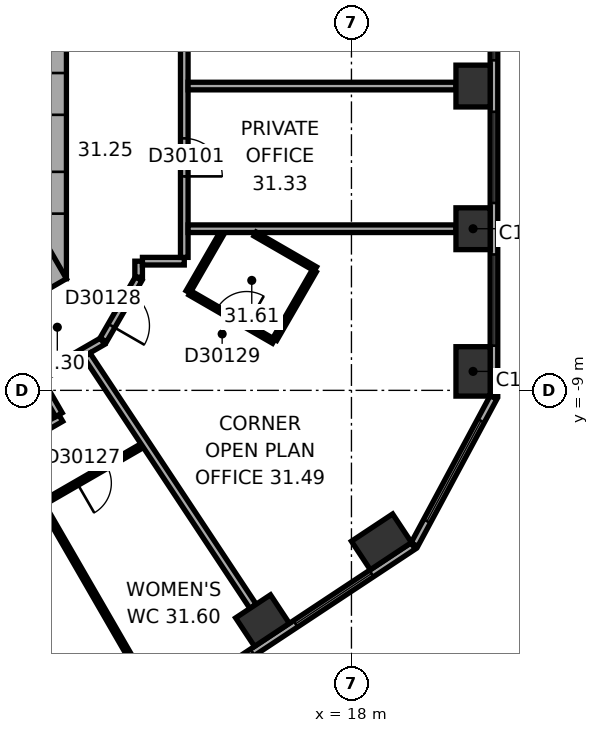
"""IFC4 building model, lengths in metres.
Left out: names, types, materials, properties, quantities, classifications, styles, units other than length and angle.
Written with IfcOpenShell. Run it as: python <this file> out.ifc"""

import sys

from ifc_helpers import new_model, si_unit, direction, frame, frame_2d, origin, origin_2d, place, context, subcontext, project, spatial, rectangle, extrude, element, fill, save


model = new_model("IFC4")
c1 = context("Model", 3, precision=1e-05, world=origin(), true_north=direction((0.0, 1.0)))
c2 = subcontext(c1, "Body", "Model", "MODEL_VIEW")
j1 = project(units=[si_unit("LENGTHUNIT", "METRE"), si_unit("PLANEANGLEUNIT", "RADIAN")], contexts=[c1])
p1 = place(None, origin())
s1 = spatial("IfcSite", under=j1, at=p1, CompositionType="ELEMENT")
p2 = place(p1, origin())
s2 = spatial("IfcBuilding", under=s1, at=p2, CompositionType="ELEMENT")
p3 = place(p2, frame((0.0, 0.0, 128.1)))
s3 = spatial("IfcBuildingStorey", under=s2, at=p3, CompositionType="ELEMENT", Elevation=128.1)
p4 = place(p3, frame((21.2, -8.501, 0.0), z_axis=(0.0, 0.0, 1.0), x_axis=(0.0, 1.0, 0.0)))
e1 = element("IfcColumn", 1, at=p4, inside=s3, PredefinedType="COLUMN", context=c2, shape_type="SweptSolid", body=[
    extrude(rectangle(XDim=1.3, YDim=0.9, at=origin_2d()), origin(), (0.0, 0.0, 1.0), 3.7),
])
for number, where, z_axis, x_axis in (
    (2, (21.2, -4.747, 0.0), (0.0, 0.0, 1.0), (0.0, 1.0, 0.0)),
    (3, (21.2, -0.993, 0.0), (0.0, 0.0, 1.0), (0.0, 1.0, 0.0)),
    (4, (15.659, -15.058, 0.0), (0.0, 0.0, 1.0), (0.834, 0.552, 0.0)),
):
    element("IfcColumn", number, at=place(p3, frame(where, z_axis=z_axis, x_axis=x_axis)), inside=s3, PredefinedType="COLUMN", context=c2, shape_type="SweptSolid", body=[
        extrude(rectangle(XDim=1.1, YDim=0.9, at=origin_2d()), origin(), (0.0, 0.0, 1.0), 3.7),
    ])
p5 = place(p3, frame((18.79, -12.986, 0.0), z_axis=(0.0, 0.0, 1.0), x_axis=(0.833885822067, 0.551936985312, 0.0)))
e5 = element("IfcColumn", 5, at=p5, inside=s3, PredefinedType="COLUMN", context=c2, shape_type="SweptSolid", body=[
    extrude(rectangle(XDim=1.3, YDim=0.9, at=origin_2d()), origin(), (0.0, 0.0, 1.0), 3.7),
])
p6 = place(p3, frame((10.0, -6.062, 0.0), z_axis=(0.0, 0.0, 1.0), x_axis=(0.0, 1.0, 0.0)))
e6 = element("IfcWall", 6, at=p6, inside=s3, PredefinedType="SHEAR", context=c2, shape_type="SweptSolid", body=[
    extrude(rectangle(XDim=12.125, YDim=1.0, at=frame_2d((6.062, 0.0))), origin(), (0.0, 0.0, 1.0), 3.7),
])
p7 = place(p6, frame((6.262, 0.0, 0.0)))
e7 = element("IfcOpeningElement", 7, at=p7, cuts=e6, PredefinedType="OPENING", context=c2, shape_type="SweptSolid", body=[
    extrude(rectangle(XDim=1.5, YDim=2.1, at=frame_2d((0.75, 1.05))), frame((0.0, 0.51, 0.0), z_axis=(0.0, -1.0, 0.0), x_axis=(1.0, 0.0, 0.0)), (0.0, 0.0, 1.0), 1.02),
])
p8 = place(p6, frame((1.712, 0.0, 0.0)))
e8 = element("IfcOpeningElement", 8, at=p8, cuts=e6, PredefinedType="OPENING", context=c2, shape_type="SweptSolid", body=[
    extrude(rectangle(XDim=1.1, YDim=2.1, at=frame_2d((0.55, 1.05))), frame((0.0, 0.51, 0.0), z_axis=(0.0, -1.0, 0.0), x_axis=(1.0, 0.0, 0.0)), (0.0, 0.0, 1.0), 1.02),
])
p9 = place(p6, frame((4.312, 0.0, 0.0)))
e9 = element("IfcOpeningElement", 9, at=p9, cuts=e6, PredefinedType="OPENING", context=c2, shape_type="SweptSolid", body=[
    extrude(rectangle(XDim=1.1, YDim=2.1, at=frame_2d((0.55, 1.05))), frame((0.0, 0.51, 0.0), z_axis=(0.0, -1.0, 0.0), x_axis=(1.0, 0.0, 0.0)), (0.0, 0.0, 1.0), 1.02),
])
p10 = place(p3, frame((-0.25, -11.691, 0.0), z_axis=(0.0, 0.0, 1.0), x_axis=(0.866022616891, 0.50000482701, 0.0)))
e10 = element("IfcWall", 10, at=p10, inside=s3, PredefinedType="SHEAR", context=c2, shape_type="SweptSolid", body=[
    extrude(rectangle(XDim=12.125, YDim=1.0, at=frame_2d((6.062, 0.0))), origin(), (0.0, 0.0, 1.0), 3.7),
])
p11 = place(p10, frame((4.012, 0.0, 0.0)))
e11 = element("IfcOpeningElement", 11, at=p11, cuts=e10, PredefinedType="OPENING", context=c2, shape_type="SweptSolid", body=[
    extrude(rectangle(XDim=0.9, YDim=2.1, at=frame_2d((0.45, 1.05))), frame((0.0, 0.51, 0.0), z_axis=(0.0, -1.0, 0.0), x_axis=(1.0, 0.0, 0.0)), (0.0, 0.0, 1.0), 1.02),
])
p12 = place(p10, frame((7.812, 0.0, 0.0)))
e12 = element("IfcOpeningElement", 12, at=p12, cuts=e10, PredefinedType="OPENING", context=c2, shape_type="SweptSolid", body=[
    extrude(rectangle(XDim=1.1, YDim=2.1, at=frame_2d((0.55, 1.05))), frame((0.0, 0.51, 0.0), z_axis=(0.0, -1.0, 0.0), x_axis=(1.0, 0.0, 0.0)), (0.0, 0.0, 1.0), 1.02),
])
p13 = place(p3, frame((21.75, -9.138, 0.0), z_axis=(0.0, 0.0, 1.0), x_axis=(0.0, 1.0, 0.0)))
e13 = element("IfcWall", 13, at=p13, inside=s3, PredefinedType="STANDARD", context=c2, shape_type="SweptSolid", body=[
    extrude(rectangle(XDim=20.044, YDim=0.2, at=frame_2d((10.022, 0.0))), origin(), (0.0, 0.0, 1.0), 3.7),
])
p14 = place(p13, frame((1.314, 0.0, 0.9)))
e14 = element("IfcOpeningElement", 14, at=p14, cuts=e13, PredefinedType="OPENING", context=c2, shape_type="SweptSolid", body=[
    extrude(rectangle(XDim=2.4, YDim=2.0, at=frame_2d((1.2, 1.0))), frame((0.0, 0.11, 0.0), z_axis=(0.0, -1.0, 0.0), x_axis=(1.0, 0.0, 0.0)), (0.0, 0.0, 1.0), 0.22),
])
p15 = place(p13, frame((5.069, 0.0, 0.9)))
e15 = element("IfcOpeningElement", 15, at=p15, cuts=e13, PredefinedType="OPENING", context=c2, shape_type="SweptSolid", body=[
    extrude(rectangle(XDim=2.4, YDim=2.0, at=frame_2d((1.2, 1.0))), frame((0.0, 0.11, 0.0), z_axis=(0.0, -1.0, 0.0), x_axis=(1.0, 0.0, 0.0)), (0.0, 0.0, 1.0), 0.22),
])
p16 = place(p13, frame((8.823, 0.0, 0.9)))
e16 = element("IfcOpeningElement", 16, at=p16, cuts=e13, PredefinedType="OPENING", context=c2, shape_type="SweptSolid", body=[
    extrude(rectangle(XDim=2.4, YDim=2.0, at=frame_2d((1.2, 1.0))), frame((0.0, 0.11, 0.0), z_axis=(0.0, -1.0, 0.0), x_axis=(1.0, 0.0, 0.0)), (0.0, 0.0, 1.0), 0.22),
])
p17 = place(p13, frame((12.577, 0.0, 0.9)))
e17 = element("IfcOpeningElement", 17, at=p17, cuts=e13, PredefinedType="OPENING", context=c2, shape_type="SweptSolid", body=[
    extrude(rectangle(XDim=2.4, YDim=2.0, at=frame_2d((1.2, 1.0))), frame((0.0, 0.11, 0.0), z_axis=(0.0, -1.0, 0.0), x_axis=(1.0, 0.0, 0.0)), (0.0, 0.0, 1.0), 0.22),
])
p18 = place(p13, frame((16.331, 0.0, 0.9)))
e18 = element("IfcOpeningElement", 18, at=p18, cuts=e13, PredefinedType="OPENING", context=c2, shape_type="SweptSolid", body=[
    extrude(rectangle(XDim=2.4, YDim=2.0, at=frame_2d((1.2, 1.0))), frame((0.0, 0.11, 0.0), z_axis=(0.0, -1.0, 0.0), x_axis=(1.0, 0.0, 0.0)), (0.0, 0.0, 1.0), 0.22),
])
p19 = place(p3, frame((2.911, -24.156, 0.0), z_axis=(0.0, 0.0, 1.0), x_axis=(0.833882163564, 0.551942512668, 0.0)))
e19 = element("IfcWall", 19, at=p19, inside=s3, PredefinedType="STANDARD", context=c2, shape_type="SweptSolid", body=[
    extrude(rectangle(XDim=20.044, YDim=0.2, at=frame_2d((10.022, 0.0))), origin(), (0.0, 0.0, 1.0), 3.7),
])
p20 = place(p19, frame((1.313, 0.0, 0.9)))
e20 = element("IfcOpeningElement", 20, at=p20, cuts=e19, PredefinedType="OPENING", context=c2, shape_type="SweptSolid", body=[
    extrude(rectangle(XDim=2.4, YDim=2.0, at=frame_2d((1.2, 1.0))), frame((0.0, 0.11, 0.0), z_axis=(0.0, -1.0, 0.0), x_axis=(1.0, 0.0, 0.0)), (0.0, 0.0, 1.0), 0.22),
])
p21 = place(p19, frame((5.067, 0.0, 0.9)))
e21 = element("IfcOpeningElement", 21, at=p21, cuts=e19, PredefinedType="OPENING", context=c2, shape_type="SweptSolid", body=[
    extrude(rectangle(XDim=2.4, YDim=2.0, at=frame_2d((1.2, 1.0))), frame((0.0, 0.11, 0.0), z_axis=(0.0, -1.0, 0.0), x_axis=(1.0, 0.0, 0.0)), (0.0, 0.0, 1.0), 0.22),
])
p22 = place(p19, frame((8.821, 0.0, 0.9)))
e22 = element("IfcOpeningElement", 22, at=p22, cuts=e19, PredefinedType="OPENING", context=c2, shape_type="SweptSolid", body=[
    extrude(rectangle(XDim=2.4, YDim=2.0, at=frame_2d((1.2, 1.0))), frame((0.0, 0.11, 0.0), z_axis=(0.0, -1.0, 0.0), x_axis=(1.0, 0.0, 0.0)), (0.0, 0.0, 1.0), 0.22),
])
p23 = place(p19, frame((12.575, 0.0, 0.9)))
e23 = element("IfcOpeningElement", 23, at=p23, cuts=e19, PredefinedType="OPENING", context=c2, shape_type="SweptSolid", body=[
    extrude(rectangle(XDim=2.4, YDim=2.0, at=frame_2d((1.2, 1.0))), frame((0.0, 0.11, 0.0), z_axis=(0.0, -1.0, 0.0), x_axis=(1.0, 0.0, 0.0)), (0.0, 0.0, 1.0), 0.22),
])
p24 = place(p19, frame((16.329, 0.0, 0.9)))
e24 = element("IfcOpeningElement", 24, at=p24, cuts=e19, PredefinedType="OPENING", context=c2, shape_type="SweptSolid", body=[
    extrude(rectangle(XDim=2.4, YDim=2.0, at=frame_2d((1.2, 1.0))), frame((0.0, 0.11, 0.0), z_axis=(0.0, -1.0, 0.0), x_axis=(1.0, 0.0, 0.0)), (0.0, 0.0, 1.0), 0.22),
])
p25 = place(p3, frame((19.658, -13.057, 0.0), z_axis=(0.0, 0.0, 1.0), x_axis=(0.473307879841, 0.880897071672, 0.0)))
e25 = element("IfcWall", 25, at=p25, inside=s3, PredefinedType="STANDARD", context=c2, shape_type="SweptSolid", body=[
    extrude(rectangle(XDim=4.395, YDim=0.2, at=frame_2d((2.197, 0.0))), origin(), (0.0, 0.0, 1.0), 3.7),
])
p26 = place(p25, frame((0.698, 0.0, 0.9)))
e26 = element("IfcOpeningElement", 26, at=p26, cuts=e25, PredefinedType="OPENING", context=c2, shape_type="SweptSolid", body=[
    extrude(rectangle(XDim=3.0, YDim=2.0, at=frame_2d((1.5, 1.0))), frame((0.0, 0.11, 0.0), z_axis=(0.0, -1.0, 0.0), x_axis=(1.0, 0.0, 0.0)), (0.0, 0.0, 1.0), 0.22),
])
p27 = place(p3, frame((6.152, -14.116, 0.0), z_axis=(0.0, 0.0, 1.0), x_axis=(0.866026788224, 0.499997602072, 0.0)))
e27 = element("IfcWall", 27, at=p27, inside=s3, PredefinedType="PARTITIONING", context=c2, shape_type="SweptSolid", body=[
    extrude(rectangle(XDim=7.322, YDim=0.12, at=frame_2d((3.661, 0.0))), origin(), (0.0, 0.0, 1.0), 3.42),
])
p28 = place(p27, frame((0.55, 0.0, 0.0)))
e28 = element("IfcOpeningElement", 28, at=p28, cuts=e27, PredefinedType="OPENING", context=c2, shape_type="SweptSolid", body=[
    extrude(rectangle(XDim=1.0, YDim=2.1, at=frame_2d((0.5, 1.05))), frame((0.0, 0.07, 0.0), z_axis=(0.0, -1.0, 0.0), x_axis=(1.0, 0.0, 0.0)), (0.0, 0.0, 1.0), 0.14),
])
p29 = place(p27, frame((2.736, 0.0, 0.0)))
e29 = element("IfcOpeningElement", 29, at=p29, cuts=e27, PredefinedType="OPENING", context=c2, shape_type="SweptSolid", body=[
    extrude(rectangle(XDim=0.9, YDim=2.1, at=frame_2d((0.45, 1.05))), frame((0.0, 0.07, 0.0), z_axis=(0.0, -1.0, 0.0), x_axis=(1.0, 0.0, 0.0)), (0.0, 0.0, 1.0), 0.14),
])
p30 = place(p27, frame((5.347, 0.0, 0.0)))
e30 = element("IfcOpeningElement", 30, at=p30, cuts=e27, PredefinedType="OPENING", context=c2, shape_type="SweptSolid", body=[
    extrude(rectangle(XDim=0.9, YDim=2.1, at=frame_2d((0.45, 1.05))), frame((0.0, 0.07, 0.0), z_axis=(0.0, -1.0, 0.0), x_axis=(1.0, 0.0, 0.0)), (0.0, 0.0, 1.0), 0.14),
])
p31 = place(p3, frame((7.319, -11.479, 0.0), z_axis=(0.0, 0.0, 1.0), x_axis=(0.866038154057, 0.49997791523, 0.0)))
e31 = element("IfcWall", 31, at=p31, inside=s3, PredefinedType="PARTITIONING", context=c2, shape_type="SweptSolid", body=[
    extrude(rectangle(XDim=3.502, YDim=0.2, at=frame_2d((1.751, 0.0))), origin(), (0.0, 0.0, 1.0), 3.42),
])
p32 = place(p31, frame((1.251, 0.0, 0.0)))
e32 = element("IfcOpeningElement", 32, at=p32, cuts=e31, PredefinedType="OPENING", context=c2, shape_type="SweptSolid", body=[
    extrude(rectangle(XDim=1.0, YDim=2.1, at=frame_2d((0.5, 1.05))), frame((0.0, 0.11, 0.0), z_axis=(0.0, -1.0, 0.0), x_axis=(1.0, 0.0, 0.0)), (0.0, 0.0, 1.0), 0.22),
])
p33 = place(p3, frame((9.752, -8.688, 0.0), z_axis=(0.0, 0.0, 1.0), x_axis=(0.865974105138, 0.500088841337, 0.0)))
e33 = element("IfcWall", 33, at=p33, inside=s3, PredefinedType="PARTITIONING", context=c2, shape_type="SweptSolid", body=[
    extrude(rectangle(XDim=1.961, YDim=0.2, at=frame_2d((0.98, 0.0))), origin(), (0.0, 0.0, 1.0), 3.42),
])
p34 = place(p3, frame((10.302, -9.642, 0.0), z_axis=(0.0, 0.0, 1.0), x_axis=(-0.500074377092, 0.865982457891, 0.0)))
e34 = element("IfcWall", 34, at=p34, inside=s3, PredefinedType="PARTITIONING", context=c2, shape_type="SweptSolid", body=[
    extrude(rectangle(XDim=1.001, YDim=0.2, at=frame_2d((0.5, 0.0))), origin(), (0.0, 0.0, 1.0), 3.42),
])
p35 = place(p3, frame((11.47, -7.673, 0.0), z_axis=(0.0, 0.0, 1.0), x_axis=(0.499964847546, 0.866045698112, 0.0)))
e35 = element("IfcWall", 35, at=p35, inside=s3, PredefinedType="PARTITIONING", context=c2, shape_type="SweptSolid", body=[
    extrude(rectangle(XDim=1.86, YDim=0.2, at=frame_2d((0.93, 0.0))), origin(), (0.0, 0.0, 1.0), 3.42),
])
p36 = place(p35, frame((0.43, 0.0, 0.0)))
e36 = element("IfcOpeningElement", 36, at=p36, cuts=e35, PredefinedType="OPENING", context=c2, shape_type="SweptSolid", body=[
    extrude(rectangle(XDim=1.0, YDim=2.1, at=frame_2d((0.5, 1.05))), frame((0.0, 0.11, 0.0), z_axis=(0.0, -1.0, 0.0), x_axis=(1.0, 0.0, 0.0)), (0.0, 0.0, 1.0), 0.22),
])
p37 = place(p3, frame((12.4, -6.022, 0.0), z_axis=(0.0, 0.0, 1.0), x_axis=(0.0, 1.0, 0.0)))
e37 = element("IfcWall", 37, at=p37, inside=s3, PredefinedType="PARTITIONING", context=c2, shape_type="SweptSolid", body=[
    extrude(rectangle(XDim=0.421, YDim=0.2, at=frame_2d((0.21, 0.0))), origin(), (0.0, 0.0, 1.0), 3.42),
])
p38 = place(p3, frame((12.5, -5.601, 0.0), z_axis=(0.0, 0.0, 1.0), x_axis=(1.0, 0.0, 0.0)))
e38 = element("IfcWall", 38, at=p38, inside=s3, PredefinedType="PARTITIONING", context=c2, shape_type="SweptSolid", body=[
    extrude(rectangle(XDim=1.101, YDim=0.2, at=frame_2d((0.551, 0.0))), origin(), (0.0, 0.0, 1.0), 3.42),
])
p39 = place(p3, frame((12.517, -16.599, 0.0), z_axis=(0.0, 0.0, 1.0), x_axis=(-0.500013727357, 0.866017478146, 0.0)))
e39 = element("IfcWall", 39, at=p39, inside=s3, PredefinedType="PARTITIONING", context=c2, shape_type="SweptSolid", body=[
    extrude(rectangle(XDim=5.272, YDim=0.12, at=frame_2d((2.636, 0.0))), origin(), (0.0, 0.0, 1.0), 3.42),
])
p40 = place(p3, frame((13.601, -5.501, 0.0), z_axis=(0.0, 0.0, 1.0), x_axis=(0.0, 1.0, 0.0)))
e40 = element("IfcWall", 40, at=p40, inside=s3, PredefinedType="PARTITIONING", context=c2, shape_type="SweptSolid", body=[
    extrude(rectangle(XDim=5.702, YDim=0.2, at=frame_2d((2.851, 0.0))), origin(), (0.0, 0.0, 1.0), 3.42),
])
p41 = place(p40, frame((2.131, 0.0, 0.0)))
e41 = element("IfcOpeningElement", 41, at=p41, cuts=e40, PredefinedType="OPENING", context=c2, shape_type="SweptSolid", body=[
    extrude(rectangle(XDim=1.0, YDim=2.1, at=frame_2d((0.5, 1.05))), frame((0.0, 0.11, 0.0), z_axis=(0.0, -1.0, 0.0), x_axis=(1.0, 0.0, 0.0)), (0.0, 0.0, 1.0), 0.22),
])
p42 = place(p3, frame((13.701, -6.409, 0.0), z_axis=(0.0, 0.0, 1.0), x_axis=(0.500078724409, 0.865979947454, 0.0)))
e42 = element("IfcWall", 42, at=p42, inside=s3, PredefinedType="PARTITIONING", context=c2, shape_type="SweptSolid", body=[
    extrude(rectangle(XDim=1.78, YDim=0.12, at=frame_2d((0.89, 0.0))), origin(), (0.0, 0.0, 1.0), 3.42),
])
p43 = place(p3, frame((13.701, -4.747, 0.0), z_axis=(0.0, 0.0, 1.0), x_axis=(1.0, 0.0, 0.0)))
e43 = element("IfcWall", 43, at=p43, inside=s3, PredefinedType="PARTITIONING", context=c2, shape_type="SweptSolid", body=[
    extrude(rectangle(XDim=7.049, YDim=0.2, at=frame_2d((3.524, 0.0))), origin(), (0.0, 0.0, 1.0), 3.42),
])
p44 = place(p3, frame((15.411, -14.683, 0.0), z_axis=(0.0, 0.0, 1.0), x_axis=(-0.551932106251, 0.833889051427, 0.0)))
e44 = element("IfcWall", 44, at=p44, inside=s3, PredefinedType="PARTITIONING", context=c2, shape_type="SweptSolid", body=[
    extrude(rectangle(XDim=7.926, YDim=0.2, at=frame_2d((3.963, 0.0))), origin(), (0.0, 0.0, 1.0), 2.87),
])
p45 = place(p3, frame((15.464, -4.887, 0.0), z_axis=(0.0, 0.0, 1.0), x_axis=(0.866063652425, -0.499933745558, 0.0)))
e45 = element("IfcWall", 45, at=p45, inside=s3, PredefinedType="PARTITIONING", context=c2, shape_type="SweptSolid", body=[
    extrude(rectangle(XDim=1.834, YDim=0.12, at=frame_2d((0.917, 0.0))), origin(), (0.0, 0.0, 1.0), 3.42),
])
p46 = place(p3, frame((15.952, -7.709, 0.0), z_axis=(0.0, 0.0, 1.0), x_axis=(-0.866063940332, 0.4999332468, 0.0)))
e46 = element("IfcWall", 46, at=p46, inside=s3, PredefinedType="PARTITIONING", context=c2, shape_type="SweptSolid", body=[
    extrude(rectangle(XDim=2.54, YDim=0.12, at=frame_2d((1.27, 0.0))), origin(), (0.0, 0.0, 1.0), 3.42),
])
p47 = place(p46, frame((0.82, 0.0, 0.0)))
e47 = element("IfcOpeningElement", 47, at=p47, cuts=e46, PredefinedType="OPENING", context=c2, shape_type="SweptSolid", body=[
    extrude(rectangle(XDim=0.9, YDim=2.1, at=frame_2d((0.45, 1.05))), frame((0.0, 0.07, 0.0), z_axis=(0.0, -1.0, 0.0), x_axis=(1.0, 0.0, 0.0)), (0.0, 0.0, 1.0), 0.14),
])
p48 = place(p3, frame((17.022, -5.856, 0.0), z_axis=(0.0, 0.0, 1.0), x_axis=(-0.500027264788, -0.866009661879, 0.0)))
e48 = element("IfcWall", 48, at=p48, inside=s3, PredefinedType="PARTITIONING", context=c2, shape_type="SweptSolid", body=[
    extrude(rectangle(XDim=2.08, YDim=0.12, at=frame_2d((1.04, 0.0))), origin(), (0.0, 0.0, 1.0), 3.42),
])
p49 = place(p3, frame((20.75, -0.993, 0.0), z_axis=(0.0, 0.0, 1.0), x_axis=(-1.0, 0.0, 0.0)))
e49 = element("IfcWall", 49, at=p49, inside=s3, PredefinedType="PARTITIONING", context=c2, shape_type="SweptSolid", body=[
    extrude(rectangle(XDim=7.049, YDim=0.2, at=frame_2d((3.524, 0.0))), origin(), (0.0, 0.0, 1.0), 2.87),
])
p50 = place(p14, origin())
e50 = element("IfcWindow", 50, at=p50, inside=s3, PartitioningType="SINGLE_PANEL", PredefinedType="WINDOW", context=c2, shape_type="SweptSolid", body=[
    extrude(rectangle(XDim=2.4, YDim=2.0, at=frame_2d((1.2, 1.0))), frame((0.0, 0.03, 0.0), z_axis=(0.0, -1.0, 0.0), x_axis=(1.0, 0.0, 0.0)), (0.0, 0.0, 1.0), 0.06),
])
fill(e14, e50)
p51 = place(p15, origin())
e51 = element("IfcWindow", 51, at=p51, inside=s3, PartitioningType="SINGLE_PANEL", PredefinedType="WINDOW", context=c2, shape_type="SweptSolid", body=[
    extrude(rectangle(XDim=2.4, YDim=2.0, at=frame_2d((1.2, 1.0))), frame((0.0, 0.03, 0.0), z_axis=(0.0, -1.0, 0.0), x_axis=(1.0, 0.0, 0.0)), (0.0, 0.0, 1.0), 0.06),
])
fill(e15, e51)
p52 = place(p16, origin())
e52 = element("IfcWindow", 52, at=p52, inside=s3, PartitioningType="SINGLE_PANEL", PredefinedType="WINDOW", context=c2, shape_type="SweptSolid", body=[
    extrude(rectangle(XDim=2.4, YDim=2.0, at=frame_2d((1.2, 1.0))), frame((0.0, 0.03, 0.0), z_axis=(0.0, -1.0, 0.0), x_axis=(1.0, 0.0, 0.0)), (0.0, 0.0, 1.0), 0.06),
])
fill(e16, e52)
p53 = place(p23, origin())
e53 = element("IfcWindow", 53, at=p53, inside=s3, PartitioningType="SINGLE_PANEL", PredefinedType="WINDOW", context=c2, shape_type="SweptSolid", body=[
    extrude(rectangle(XDim=2.4, YDim=2.0, at=frame_2d((1.2, 1.0))), frame((0.0, 0.03, 0.0), z_axis=(0.0, -1.0, 0.0), x_axis=(1.0, 0.0, 0.0)), (0.0, 0.0, 1.0), 0.06),
])
fill(e23, e53)
p54 = place(p24, origin())
e54 = element("IfcWindow", 54, at=p54, inside=s3, PartitioningType="SINGLE_PANEL", PredefinedType="WINDOW", context=c2, shape_type="SweptSolid", body=[
    extrude(rectangle(XDim=2.4, YDim=2.0, at=frame_2d((1.2, 1.0))), frame((0.0, 0.03, 0.0), z_axis=(0.0, -1.0, 0.0), x_axis=(1.0, 0.0, 0.0)), (0.0, 0.0, 1.0), 0.06),
])
fill(e24, e54)
p55 = place(p26, origin())
e55 = element("IfcWindow", 55, at=p55, inside=s3, PartitioningType="SINGLE_PANEL", PredefinedType="WINDOW", context=c2, shape_type="SweptSolid", body=[
    extrude(rectangle(XDim=3.0, YDim=2.0, at=frame_2d((1.5, 1.0))), frame((0.0, 0.03, 0.0), z_axis=(0.0, -1.0, 0.0), x_axis=(1.0, 0.0, 0.0)), (0.0, 0.0, 1.0), 0.06),
])
fill(e26, e55)
p56 = place(p41, origin())
e56 = element("IfcDoor", 56, at=p56, inside=s3, OperationType="SINGLE_SWING_LEFT", PredefinedType="DOOR", context=c2, shape_type="SweptSolid", body=[
    extrude(rectangle(XDim=1.0, YDim=2.1, at=frame_2d((0.5, 1.05))), frame((0.0, 0.025, 0.0), z_axis=(0.0, -1.0, 0.0), x_axis=(1.0, 0.0, 0.0)), (0.0, 0.0, 1.0), 0.05),
])
fill(e41, e56)
p57 = place(p30, origin())
e57 = element("IfcDoor", 57, at=p57, inside=s3, OperationType="SINGLE_SWING_LEFT", PredefinedType="DOOR", context=c2, shape_type="SweptSolid", body=[
    extrude(rectangle(XDim=0.9, YDim=2.1, at=frame_2d((0.45, 1.05))), frame((0.0, 0.025, 0.0), z_axis=(0.0, -1.0, 0.0), x_axis=(1.0, 0.0, 0.0)), (0.0, 0.0, 1.0), 0.05),
])
fill(e30, e57)
p58 = place(p36, origin())
e58 = element("IfcDoor", 58, at=p58, inside=s3, OperationType="SINGLE_SWING_LEFT", PredefinedType="DOOR", context=c2, shape_type="SweptSolid", body=[
    extrude(rectangle(XDim=1.0, YDim=2.1, at=frame_2d((0.5, 1.05))), frame((0.0, 0.025, 0.0), z_axis=(0.0, -1.0, 0.0), x_axis=(1.0, 0.0, 0.0)), (0.0, 0.0, 1.0), 0.05),
])
fill(e36, e58)
p59 = place(p47, origin())
e59 = element("IfcDoor", 59, at=p59, inside=s3, OperationType="SINGLE_SWING_LEFT", PredefinedType="DOOR", context=c2, shape_type="SweptSolid", body=[
    extrude(rectangle(XDim=0.9, YDim=2.1, at=frame_2d((0.45, 1.05))), frame((0.0, 0.025, 0.0), z_axis=(0.0, -1.0, 0.0), x_axis=(1.0, 0.0, 0.0)), (0.0, 0.0, 1.0), 0.05),
])
fill(e47, e59)
save(model, sys.argv[1])
